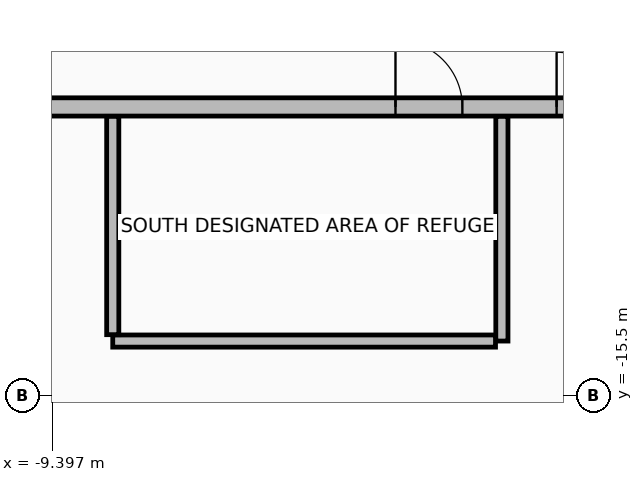
"""IFC4 building model, lengths in metres.
Left out: names, types, materials, properties, quantities, classifications, styles, units other than length and angle.
Written with IfcOpenShell. Run it as: python <this file> out.ifc"""

import sys

from ifc_helpers import new_model, si_unit, direction, frame, frame_2d, origin, place, context, subcontext, project, spatial, rectangle, extrude, element, fill, save


model = new_model("IFC4")
c1 = context("Model", 3, precision=1e-05, world=origin(), true_north=direction((0.0, 1.0)))
c2 = subcontext(c1, "Body", "Model", "MODEL_VIEW")
j1 = project(units=[si_unit("LENGTHUNIT", "METRE"), si_unit("PLANEANGLEUNIT", "RADIAN")], contexts=[c1])
p1 = place(None, origin())
s1 = spatial("IfcSite", under=j1, at=p1, CompositionType="ELEMENT")
p2 = place(p1, origin())
s2 = spatial("IfcBuilding", under=s1, at=p2, CompositionType="ELEMENT")
p3 = place(p2, frame((0.0, 0.0, 81.1)))
s3 = spatial("IfcBuildingStorey", under=s2, at=p3, CompositionType="ELEMENT", Elevation=81.1)
p4 = place(p3, frame((-12.05, -10.75, 0.0), z_axis=(0.0, 0.0, 1.0), x_axis=(1.0, 0.0, 0.0)))
e1 = element("IfcWall", 1, at=p4, inside=s3, PredefinedType="STANDARD", context=c2, shape_type="SweptSolid", body=[
    extrude(rectangle(XDim=24.1, YDim=0.3, at=frame_2d((12.05, 0.0))), origin(), (0.0, 0.0, 1.0), 2.605),
])
p5 = place(p4, frame((10.95, 0.0, 0.0)))
e2 = element("IfcOpeningElement", 2, at=p5, cuts=e1, PredefinedType="OPENING", context=c2, shape_type="SweptSolid", body=[
    extrude(rectangle(XDim=1.8, YDim=2.3, at=frame_2d((0.9, 1.15))), frame((0.0, 0.16, 0.0), z_axis=(0.0, -1.0, 0.0), x_axis=(1.0, 0.0, 0.0)), (0.0, 0.0, 1.0), 0.32),
])
p6 = place(p4, frame((8.3, 0.0, 0.0)))
e3 = element("IfcOpeningElement", 3, at=p6, cuts=e1, PredefinedType="OPENING", context=c2, shape_type="SweptSolid", body=[
    extrude(rectangle(XDim=1.1, YDim=2.15, at=frame_2d((0.55, 1.075))), frame((0.0, 0.16, 0.0), z_axis=(0.0, -1.0, 0.0), x_axis=(1.0, 0.0, 0.0)), (0.0, 0.0, 1.0), 0.32),
])
p7 = place(p4, frame((16.477, 0.0, 0.0)))
e4 = element("IfcOpeningElement", 4, at=p7, cuts=e1, PredefinedType="OPENING", context=c2, shape_type="SweptSolid", body=[
    extrude(rectangle(XDim=0.9, YDim=2.1, at=frame_2d((0.45, 1.05))), frame((0.0, 0.16, 0.0), z_axis=(0.0, -1.0, 0.0), x_axis=(1.0, 0.0, 0.0)), (0.0, 0.0, 1.0), 0.32),
])
p8 = place(p3, frame((-2.0, -10.905, 0.0), z_axis=(0.0, 0.0, 1.0), x_axis=(0.0, -1.0, 0.0)))
e5 = element("IfcWall", 5, at=p8, inside=s3, PredefinedType="PARTITIONING", context=c2, shape_type="SweptSolid", body=[
    extrude(rectangle(XDim=3.695, YDim=0.2, at=frame_2d((1.848, 0.0))), origin(), (0.0, 0.0, 1.0), 4.81),
])
p9 = place(p3, frame((-2.105, -14.6, 0.0), z_axis=(0.0, 0.0, 1.0), x_axis=(-1.0, 0.0, 0.0)))
e6 = element("IfcWall", 6, at=p9, inside=s3, PredefinedType="PARTITIONING", context=c2, shape_type="SweptSolid", body=[
    extrude(rectangle(XDim=6.295, YDim=0.2, at=frame_2d((3.147, 0.0))), origin(), (0.0, 0.0, 1.0), 2.605),
])
p10 = place(p3, frame((-8.4, -14.495, 0.0), z_axis=(0.0, 0.0, 1.0), x_axis=(0.0, 1.0, 0.0)))
e7 = element("IfcWall", 7, at=p10, inside=s3, PredefinedType="PARTITIONING", context=c2, shape_type="SweptSolid", body=[
    extrude(rectangle(XDim=3.59, YDim=0.2, at=frame_2d((1.795, 0.0))), origin(), (0.0, 0.0, 1.0), 4.81),
])
p11 = place(p5, frame((1.8, 0.0, 0.0), z_axis=(0.0, 0.0, 1.0), x_axis=(-1.0, 0.0, 0.0)))
e8 = element("IfcDoor", 8, at=p11, inside=s3, OperationType="DOUBLE_DOOR_SINGLE_SWING", PredefinedType="DOOR", context=c2, shape_type="SweptSolid", body=[
    extrude(rectangle(XDim=1.8, YDim=2.3, at=frame_2d((0.9, 1.15))), frame((0.0, 0.025, 0.0), z_axis=(0.0, -1.0, 0.0), x_axis=(1.0, 0.0, 0.0)), (0.0, 0.0, 1.0), 0.05),
])
fill(e2, e8)
p12 = place(p6, origin())
e9 = element("IfcDoor", 9, at=p12, inside=s3, OperationType="SINGLE_SWING_LEFT", PredefinedType="DOOR", context=c2, shape_type="SweptSolid", body=[
    extrude(rectangle(XDim=1.1, YDim=2.15, at=frame_2d((0.55, 1.075))), frame((0.0, 0.025, 0.0), z_axis=(0.0, -1.0, 0.0), x_axis=(1.0, 0.0, 0.0)), (0.0, 0.0, 1.0), 0.05),
])
fill(e3, e9)
save(model, sys.argv[1])
